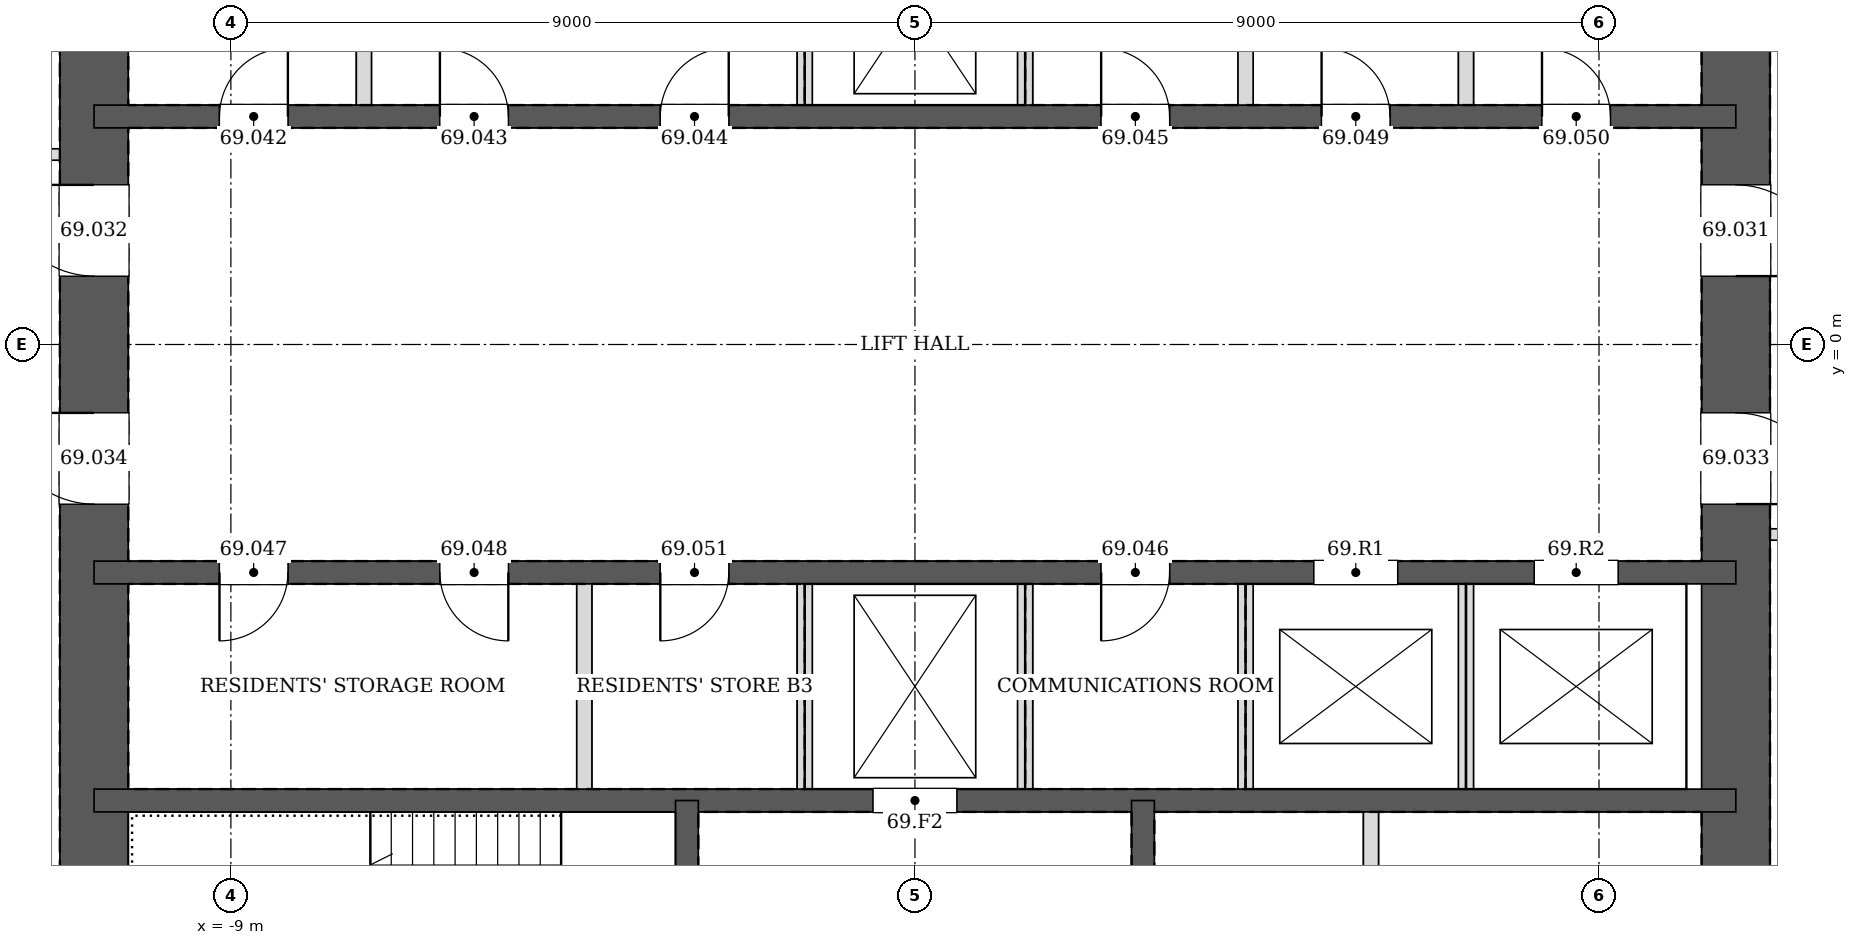
"""IFC4 building model, lengths in metres.
Left out: names, types, materials, properties, quantities, classifications, styles, units other than length and angle.
Written with IfcOpenShell. Run it as: python <this file> out.ifc"""

import sys

from ifc_helpers import new_model, si_unit, direction, frame, frame_2d, origin, place, context, subcontext, project, spatial, rectangle, extrude, element, fill, save


model = new_model("IFC4")
c1 = context("Model", 3, precision=1e-05, world=origin(), true_north=direction((0.0, 1.0)))
c2 = subcontext(c1, "Body", "Model", "MODEL_VIEW")
j1 = project(units=[si_unit("LENGTHUNIT", "METRE"), si_unit("PLANEANGLEUNIT", "RADIAN")], contexts=[c1])
p1 = place(None, origin())
s1 = spatial("IfcSite", under=j1, at=p1, CompositionType="ELEMENT")
p2 = place(p1, origin())
s2 = spatial("IfcBuilding", under=s1, at=p2, CompositionType="ELEMENT")
p3 = place(p2, frame((0.0, 0.0, 284.4)))
s3 = spatial("IfcBuildingStorey", under=s2, at=p3, CompositionType="ELEMENT", Elevation=284.4)
p4 = place(p3, frame((10.8, -10.8, 0.0), z_axis=(0.0, 0.0, 1.0), x_axis=(0.0, 1.0, 0.0)))
e1 = element("IfcWall", 1, at=p4, inside=s3, PredefinedType="SOLIDWALL", context=c2, shape_type="SweptSolid", body=[
    extrude(rectangle(XDim=21.6, YDim=0.9, at=frame_2d((10.8, 0.0))), origin(), (0.0, 0.0, 1.0), 3.4),
])
p5 = place(p4, frame((11.7, 0.0, 0.0)))
e2 = element("IfcOpeningElement", 2, at=p5, cuts=e1, PredefinedType="OPENING", context=c2, shape_type="SweptSolid", body=[
    extrude(rectangle(XDim=1.2, YDim=2.1, at=frame_2d((0.6, 1.05))), frame((0.0, 0.46, 0.0), z_axis=(0.0, -1.0, 0.0), x_axis=(1.0, 0.0, 0.0)), (0.0, 0.0, 1.0), 0.92),
])
p6 = place(p4, frame((8.7, 0.0, 0.0)))
e3 = element("IfcOpeningElement", 3, at=p6, cuts=e1, PredefinedType="OPENING", context=c2, shape_type="SweptSolid", body=[
    extrude(rectangle(XDim=1.2, YDim=2.1, at=frame_2d((0.6, 1.05))), frame((0.0, 0.46, 0.0), z_axis=(0.0, -1.0, 0.0), x_axis=(1.0, 0.0, 0.0)), (0.0, 0.0, 1.0), 0.92),
])
p7 = place(p3, frame((-10.8, 10.8, 0.0), z_axis=(0.0, 0.0, 1.0), x_axis=(0.0, -1.0, 0.0)))
e4 = element("IfcWall", 4, at=p7, inside=s3, PredefinedType="SOLIDWALL", context=c2, shape_type="SweptSolid", body=[
    extrude(rectangle(XDim=21.6, YDim=0.9, at=frame_2d((10.8, 0.0))), origin(), (0.0, 0.0, 1.0), 3.4),
])
p8 = place(p7, frame((8.7, 0.0, 0.0)))
e5 = element("IfcOpeningElement", 5, at=p8, cuts=e4, PredefinedType="OPENING", context=c2, shape_type="SweptSolid", body=[
    extrude(rectangle(XDim=1.2, YDim=2.1, at=frame_2d((0.6, 1.05))), frame((0.0, 0.46, 0.0), z_axis=(0.0, -1.0, 0.0), x_axis=(1.0, 0.0, 0.0)), (0.0, 0.0, 1.0), 0.92),
])
p9 = place(p7, frame((11.7, 0.0, 0.0)))
e6 = element("IfcOpeningElement", 6, at=p9, cuts=e4, PredefinedType="OPENING", context=c2, shape_type="SweptSolid", body=[
    extrude(rectangle(XDim=1.2, YDim=2.1, at=frame_2d((0.6, 1.05))), frame((0.0, 0.46, 0.0), z_axis=(0.0, -1.0, 0.0), x_axis=(1.0, 0.0, 0.0)), (0.0, 0.0, 1.0), 0.92),
])
p10 = place(p3, frame((-10.8, 3.0, 0.0), z_axis=(0.0, 0.0, 1.0), x_axis=(1.0, 0.0, 0.0)))
e7 = element("IfcWall", 7, at=p10, inside=s3, PredefinedType="SOLIDWALL", context=c2, shape_type="SweptSolid", body=[
    extrude(rectangle(XDim=21.6, YDim=0.3, at=frame_2d((10.8, 0.0))), origin(), (0.0, 0.0, 1.0), 3.4),
])
p11 = place(p10, frame((1.65, 0.0, 0.0)))
e8 = element("IfcOpeningElement", 8, at=p11, cuts=e7, PredefinedType="OPENING", context=c2, shape_type="SweptSolid", body=[
    extrude(rectangle(XDim=0.9, YDim=2.1, at=frame_2d((0.45, 1.05))), frame((0.0, 0.16, 0.0), z_axis=(0.0, -1.0, 0.0), x_axis=(1.0, 0.0, 0.0)), (0.0, 0.0, 1.0), 0.32),
])
p12 = place(p10, frame((4.55, 0.0, 0.0)))
e9 = element("IfcOpeningElement", 9, at=p12, cuts=e7, PredefinedType="OPENING", context=c2, shape_type="SweptSolid", body=[
    extrude(rectangle(XDim=0.9, YDim=2.1, at=frame_2d((0.45, 1.05))), frame((0.0, 0.16, 0.0), z_axis=(0.0, -1.0, 0.0), x_axis=(1.0, 0.0, 0.0)), (0.0, 0.0, 1.0), 0.32),
])
p13 = place(p10, frame((7.45, 0.0, 0.0)))
e10 = element("IfcOpeningElement", 10, at=p13, cuts=e7, PredefinedType="OPENING", context=c2, shape_type="SweptSolid", body=[
    extrude(rectangle(XDim=0.9, YDim=2.1, at=frame_2d((0.45, 1.05))), frame((0.0, 0.16, 0.0), z_axis=(0.0, -1.0, 0.0), x_axis=(1.0, 0.0, 0.0)), (0.0, 0.0, 1.0), 0.32),
])
p14 = place(p10, frame((13.25, 0.0, 0.0)))
e11 = element("IfcOpeningElement", 11, at=p14, cuts=e7, PredefinedType="OPENING", context=c2, shape_type="SweptSolid", body=[
    extrude(rectangle(XDim=0.9, YDim=2.1, at=frame_2d((0.45, 1.05))), frame((0.0, 0.16, 0.0), z_axis=(0.0, -1.0, 0.0), x_axis=(1.0, 0.0, 0.0)), (0.0, 0.0, 1.0), 0.32),
])
p15 = place(p10, frame((16.15, 0.0, 0.0)))
e12 = element("IfcOpeningElement", 12, at=p15, cuts=e7, PredefinedType="OPENING", context=c2, shape_type="SweptSolid", body=[
    extrude(rectangle(XDim=0.9, YDim=2.1, at=frame_2d((0.45, 1.05))), frame((0.0, 0.16, 0.0), z_axis=(0.0, -1.0, 0.0), x_axis=(1.0, 0.0, 0.0)), (0.0, 0.0, 1.0), 0.32),
])
p16 = place(p10, frame((19.05, 0.0, 0.0)))
e13 = element("IfcOpeningElement", 13, at=p16, cuts=e7, PredefinedType="OPENING", context=c2, shape_type="SweptSolid", body=[
    extrude(rectangle(XDim=0.9, YDim=2.1, at=frame_2d((0.45, 1.05))), frame((0.0, 0.16, 0.0), z_axis=(0.0, -1.0, 0.0), x_axis=(1.0, 0.0, 0.0)), (0.0, 0.0, 1.0), 0.32),
])
p17 = place(p3, frame((-10.8, -3.0, 0.0), z_axis=(0.0, 0.0, 1.0), x_axis=(1.0, 0.0, 0.0)))
e14 = element("IfcWall", 14, at=p17, inside=s3, PredefinedType="SOLIDWALL", context=c2, shape_type="SweptSolid", body=[
    extrude(rectangle(XDim=21.6, YDim=0.3, at=frame_2d((10.8, 0.0))), origin(), (0.0, 0.0, 1.0), 3.4),
])
p18 = place(p17, frame((13.25, 0.0, 0.0)))
e15 = element("IfcOpeningElement", 15, at=p18, cuts=e14, PredefinedType="OPENING", context=c2, shape_type="SweptSolid", body=[
    extrude(rectangle(XDim=0.9, YDim=2.1, at=frame_2d((0.45, 1.05))), frame((0.0, 0.16, 0.0), z_axis=(0.0, -1.0, 0.0), x_axis=(1.0, 0.0, 0.0)), (0.0, 0.0, 1.0), 0.32),
])
p19 = place(p17, frame((1.65, 0.0, 0.0)))
e16 = element("IfcOpeningElement", 16, at=p19, cuts=e14, PredefinedType="OPENING", context=c2, shape_type="SweptSolid", body=[
    extrude(rectangle(XDim=0.9, YDim=2.1, at=frame_2d((0.45, 1.05))), frame((0.0, 0.16, 0.0), z_axis=(0.0, -1.0, 0.0), x_axis=(1.0, 0.0, 0.0)), (0.0, 0.0, 1.0), 0.32),
])
p20 = place(p17, frame((4.55, 0.0, 0.0)))
e17 = element("IfcOpeningElement", 17, at=p20, cuts=e14, PredefinedType="OPENING", context=c2, shape_type="SweptSolid", body=[
    extrude(rectangle(XDim=0.9, YDim=2.1, at=frame_2d((0.45, 1.05))), frame((0.0, 0.16, 0.0), z_axis=(0.0, -1.0, 0.0), x_axis=(1.0, 0.0, 0.0)), (0.0, 0.0, 1.0), 0.32),
])
p21 = place(p17, frame((7.45, 0.0, 0.0)))
e18 = element("IfcOpeningElement", 18, at=p21, cuts=e14, PredefinedType="OPENING", context=c2, shape_type="SweptSolid", body=[
    extrude(rectangle(XDim=0.9, YDim=2.1, at=frame_2d((0.45, 1.05))), frame((0.0, 0.16, 0.0), z_axis=(0.0, -1.0, 0.0), x_axis=(1.0, 0.0, 0.0)), (0.0, 0.0, 1.0), 0.32),
])
p22 = place(p17, frame((16.05, 0.0, 0.0)))
e19 = element("IfcOpeningElement", 19, at=p22, cuts=e14, PredefinedType="OPENING", context=c2, shape_type="SweptSolid", body=[
    extrude(rectangle(XDim=1.1, YDim=2.1, at=frame_2d((0.55, 1.05))), frame((0.0, 0.16, 0.0), z_axis=(0.0, -1.0, 0.0), x_axis=(1.0, 0.0, 0.0)), (0.0, 0.0, 1.0), 0.32),
])
p23 = place(p17, frame((18.95, 0.0, 0.0)))
e20 = element("IfcOpeningElement", 20, at=p23, cuts=e14, PredefinedType="OPENING", context=c2, shape_type="SweptSolid", body=[
    extrude(rectangle(XDim=1.1, YDim=2.1, at=frame_2d((0.55, 1.05))), frame((0.0, 0.16, 0.0), z_axis=(0.0, -1.0, 0.0), x_axis=(1.0, 0.0, 0.0)), (0.0, 0.0, 1.0), 0.32),
])
p24 = place(p3, frame((-10.8, -6.0, 0.0), z_axis=(0.0, 0.0, 1.0), x_axis=(1.0, 0.0, 0.0)))
e21 = element("IfcWall", 21, at=p24, inside=s3, PredefinedType="SOLIDWALL", context=c2, shape_type="SweptSolid", body=[
    extrude(rectangle(XDim=21.6, YDim=0.3, at=frame_2d((10.8, 0.0))), origin(), (0.0, 0.0, 1.0), 3.4),
])
p25 = place(p24, frame((10.25, 0.0, 0.0)))
e22 = element("IfcOpeningElement", 22, at=p25, cuts=e21, PredefinedType="OPENING", context=c2, shape_type="SweptSolid", body=[
    extrude(rectangle(XDim=1.1, YDim=2.1, at=frame_2d((0.55, 1.05))), frame((0.0, 0.16, 0.0), z_axis=(0.0, -1.0, 0.0), x_axis=(1.0, 0.0, 0.0)), (0.0, 0.0, 1.0), 0.32),
])
p26 = place(p3, frame((-3.0, -6.0, 0.0), z_axis=(0.0, 0.0, 1.0), x_axis=(0.0, -1.0, 0.0)))
e23 = element("IfcWall", 23, at=p26, inside=s3, PredefinedType="SOLIDWALL", context=c2, shape_type="SweptSolid", body=[
    extrude(rectangle(XDim=4.8, YDim=0.3, at=frame_2d((2.4, 0.0))), origin(), (0.0, 0.0, 1.0), 3.4),
])
p27 = place(p26, frame((1.75, 0.0, 0.0)))
e24 = element("IfcOpeningElement", 24, at=p27, cuts=e23, PredefinedType="OPENING", context=c2, shape_type="SweptSolid", body=[
    extrude(rectangle(XDim=1.0, YDim=2.1, at=frame_2d((0.5, 1.05))), frame((0.0, 0.16, 0.0), z_axis=(0.0, -1.0, 0.0), x_axis=(1.0, 0.0, 0.0)), (0.0, 0.0, 1.0), 0.32),
])
p28 = place(p3, frame((3.0, -6.0, 0.0), z_axis=(0.0, 0.0, 1.0), x_axis=(0.0, -1.0, 0.0)))
e25 = element("IfcWall", 25, at=p28, inside=s3, PredefinedType="SOLIDWALL", context=c2, shape_type="SweptSolid", body=[
    extrude(rectangle(XDim=4.8, YDim=0.3, at=frame_2d((2.4, 0.0))), origin(), (0.0, 0.0, 1.0), 3.4),
])
for number, where, z_axis, x_axis in (
    (26, (11.25, -2.5, 0.0), (0.0, 0.0, 1.0), (1.0, 0.0, 0.0)),
    (27, (-11.25, 2.5, 0.0), (0.0, 0.0, 1.0), (-1.0, 0.0, 0.0)),
):
    element("IfcWall", number, at=place(p3, frame(where, z_axis=z_axis, x_axis=x_axis)), inside=s3, PredefinedType="PARTITIONING", context=c2, shape_type="SweptSolid", body=[
        extrude(rectangle(XDim=1.8, YDim=0.15, at=frame_2d((0.9, 0.0))), origin(), (0.0, 0.0, 1.0), 3.2),
    ])
for number, where, z_axis, x_axis in (
    (28, (-7.25, 3.15, 0.0), (0.0, 0.0, 1.0), (0.0, 1.0, 0.0)),
    (29, (-1.45, 3.15, 0.0), (0.0, 0.0, 1.0), (0.0, 1.0, 0.0)),
    (30, (1.45, 3.15, 0.0), (0.0, 0.0, 1.0), (0.0, 1.0, 0.0)),
    (31, (4.35, 3.15, 0.0), (0.0, 0.0, 1.0), (0.0, 1.0, 0.0)),
    (32, (7.25, 3.15, 0.0), (0.0, 0.0, 1.0), (0.0, 1.0, 0.0)),
    (33, (-4.35, -5.85, 0.0), (0.0, 0.0, 1.0), (0.0, 1.0, 0.0)),
    (34, (-1.45, -5.85, 0.0), (0.0, 0.0, 1.0), (0.0, 1.0, 0.0)),
    (35, (1.45, -5.85, 0.0), (0.0, 0.0, 1.0), (0.0, 1.0, 0.0)),
    (36, (4.35, -5.85, 0.0), (0.0, 0.0, 1.0), (0.0, 1.0, 0.0)),
):
    element("IfcWall", number, at=place(p3, frame(where, z_axis=z_axis, x_axis=x_axis)), inside=s3, PredefinedType="PARTITIONING", context=c2, shape_type="SweptSolid", body=[
        extrude(rectangle(XDim=2.7, YDim=0.2, at=frame_2d((1.35, 0.0))), origin(), (0.0, 0.0, 1.0), 3.2),
    ])
p29 = place(p3, frame((7.25, -5.85, 0.0), z_axis=(0.0, 0.0, 1.0), x_axis=(0.0, 1.0, 0.0)))
e37 = element("IfcWall", 37, at=p29, inside=s3, PredefinedType="PARTITIONING", context=c2, shape_type="SweptSolid", body=[
    extrude(rectangle(XDim=2.7, YDim=0.2, at=frame_2d((1.35, 0.0))), origin(), (0.0, 0.0, 1.0), 3.4),
])
p30 = place(p3, frame((6.0, -10.35, 0.0), z_axis=(0.0, 0.0, 1.0), x_axis=(0.0, 1.0, 0.0)))
e38 = element("IfcWall", 38, at=p30, inside=s3, PredefinedType="PARTITIONING", context=c2, shape_type="SweptSolid", body=[
    extrude(rectangle(XDim=4.2, YDim=0.2, at=frame_2d((2.1, 0.0))), origin(), (0.0, 0.0, 1.0), 3.2),
])
p31 = place(p30, frame((0.3, 0.0, 0.0)))
e39 = element("IfcOpeningElement", 39, at=p31, cuts=e38, PredefinedType="OPENING", context=c2, shape_type="SweptSolid", body=[
    extrude(rectangle(XDim=0.9, YDim=2.1, at=frame_2d((0.45, 1.05))), frame((0.0, 0.11, 0.0), z_axis=(0.0, -1.0, 0.0), x_axis=(1.0, 0.0, 0.0)), (0.0, 0.0, 1.0), 0.22),
])
p32 = place(p5, frame((1.2, 0.0, 0.0), z_axis=(0.0, 0.0, 1.0), x_axis=(-1.0, 0.0, 0.0)))
e40 = element("IfcDoor", 40, at=p32, inside=s3, OperationType="SINGLE_SWING_RIGHT", PredefinedType="DOOR", context=c2, shape_type="SweptSolid", body=[
    extrude(rectangle(XDim=1.2, YDim=2.1, at=frame_2d((0.6, 1.05))), frame((0.0, 0.025, 0.0), z_axis=(0.0, -1.0, 0.0), x_axis=(1.0, 0.0, 0.0)), (0.0, 0.0, 1.0), 0.05),
])
fill(e2, e40)
p33 = place(p8, frame((1.2, 0.0, 0.0), z_axis=(0.0, 0.0, 1.0), x_axis=(-1.0, 0.0, 0.0)))
e41 = element("IfcDoor", 41, at=p33, inside=s3, OperationType="SINGLE_SWING_RIGHT", PredefinedType="DOOR", context=c2, shape_type="SweptSolid", body=[
    extrude(rectangle(XDim=1.2, YDim=2.1, at=frame_2d((0.6, 1.05))), frame((0.0, 0.025, 0.0), z_axis=(0.0, -1.0, 0.0), x_axis=(1.0, 0.0, 0.0)), (0.0, 0.0, 1.0), 0.05),
])
fill(e5, e41)
p34 = place(p6, frame((1.2, 0.0, 0.0), z_axis=(0.0, 0.0, 1.0), x_axis=(-1.0, 0.0, 0.0)))
e42 = element("IfcDoor", 42, at=p34, inside=s3, OperationType="SINGLE_SWING_RIGHT", PredefinedType="DOOR", context=c2, shape_type="SweptSolid", body=[
    extrude(rectangle(XDim=1.2, YDim=2.1, at=frame_2d((0.6, 1.05))), frame((0.0, 0.025, 0.0), z_axis=(0.0, -1.0, 0.0), x_axis=(1.0, 0.0, 0.0)), (0.0, 0.0, 1.0), 0.05),
])
fill(e3, e42)
p35 = place(p9, frame((1.2, 0.0, 0.0), z_axis=(0.0, 0.0, 1.0), x_axis=(-1.0, 0.0, 0.0)))
e43 = element("IfcDoor", 43, at=p35, inside=s3, OperationType="SINGLE_SWING_RIGHT", PredefinedType="DOOR", context=c2, shape_type="SweptSolid", body=[
    extrude(rectangle(XDim=1.2, YDim=2.1, at=frame_2d((0.6, 1.05))), frame((0.0, 0.025, 0.0), z_axis=(0.0, -1.0, 0.0), x_axis=(1.0, 0.0, 0.0)), (0.0, 0.0, 1.0), 0.05),
])
fill(e6, e43)
p36 = place(p11, origin())
e44 = element("IfcDoor", 44, at=p36, inside=s3, OperationType="SINGLE_SWING_RIGHT", PredefinedType="DOOR", context=c2, shape_type="SweptSolid", body=[
    extrude(rectangle(XDim=0.9, YDim=2.1, at=frame_2d((0.45, 1.05))), frame((0.0, 0.025, 0.0), z_axis=(0.0, -1.0, 0.0), x_axis=(1.0, 0.0, 0.0)), (0.0, 0.0, 1.0), 0.05),
])
fill(e8, e44)
p37 = place(p12, origin())
e45 = element("IfcDoor", 45, at=p37, inside=s3, OperationType="SINGLE_SWING_LEFT", PredefinedType="DOOR", context=c2, shape_type="SweptSolid", body=[
    extrude(rectangle(XDim=0.9, YDim=2.1, at=frame_2d((0.45, 1.05))), frame((0.0, 0.025, 0.0), z_axis=(0.0, -1.0, 0.0), x_axis=(1.0, 0.0, 0.0)), (0.0, 0.0, 1.0), 0.05),
])
fill(e9, e45)
p38 = place(p13, origin())
e46 = element("IfcDoor", 46, at=p38, inside=s3, OperationType="SINGLE_SWING_RIGHT", PredefinedType="DOOR", context=c2, shape_type="SweptSolid", body=[
    extrude(rectangle(XDim=0.9, YDim=2.1, at=frame_2d((0.45, 1.05))), frame((0.0, 0.025, 0.0), z_axis=(0.0, -1.0, 0.0), x_axis=(1.0, 0.0, 0.0)), (0.0, 0.0, 1.0), 0.05),
])
fill(e10, e46)
p39 = place(p14, origin())
e47 = element("IfcDoor", 47, at=p39, inside=s3, OperationType="SINGLE_SWING_LEFT", PredefinedType="DOOR", context=c2, shape_type="SweptSolid", body=[
    extrude(rectangle(XDim=0.9, YDim=2.1, at=frame_2d((0.45, 1.05))), frame((0.0, 0.025, 0.0), z_axis=(0.0, -1.0, 0.0), x_axis=(1.0, 0.0, 0.0)), (0.0, 0.0, 1.0), 0.05),
])
fill(e11, e47)
p40 = place(p18, frame((0.9, 0.0, 0.0), z_axis=(0.0, 0.0, 1.0), x_axis=(-1.0, 0.0, 0.0)))
e48 = element("IfcDoor", 48, at=p40, inside=s3, OperationType="SINGLE_SWING_RIGHT", PredefinedType="DOOR", context=c2, shape_type="SweptSolid", body=[
    extrude(rectangle(XDim=0.9, YDim=2.1, at=frame_2d((0.45, 1.05))), frame((0.0, 0.025, 0.0), z_axis=(0.0, -1.0, 0.0), x_axis=(1.0, 0.0, 0.0)), (0.0, 0.0, 1.0), 0.05),
])
fill(e15, e48)
p41 = place(p19, frame((0.9, 0.0, 0.0), z_axis=(0.0, 0.0, 1.0), x_axis=(-1.0, 0.0, 0.0)))
e49 = element("IfcDoor", 49, at=p41, inside=s3, OperationType="SINGLE_SWING_RIGHT", PredefinedType="DOOR", context=c2, shape_type="SweptSolid", body=[
    extrude(rectangle(XDim=0.9, YDim=2.1, at=frame_2d((0.45, 1.05))), frame((0.0, 0.025, 0.0), z_axis=(0.0, -1.0, 0.0), x_axis=(1.0, 0.0, 0.0)), (0.0, 0.0, 1.0), 0.05),
])
fill(e16, e49)
p42 = place(p20, frame((0.9, 0.0, 0.0), z_axis=(0.0, 0.0, 1.0), x_axis=(-1.0, 0.0, 0.0)))
e50 = element("IfcDoor", 50, at=p42, inside=s3, OperationType="SINGLE_SWING_LEFT", PredefinedType="DOOR", context=c2, shape_type="SweptSolid", body=[
    extrude(rectangle(XDim=0.9, YDim=2.1, at=frame_2d((0.45, 1.05))), frame((0.0, 0.025, 0.0), z_axis=(0.0, -1.0, 0.0), x_axis=(1.0, 0.0, 0.0)), (0.0, 0.0, 1.0), 0.05),
])
fill(e17, e50)
p43 = place(p15, origin())
e51 = element("IfcDoor", 51, at=p43, inside=s3, OperationType="SINGLE_SWING_LEFT", PredefinedType="DOOR", context=c2, shape_type="SweptSolid", body=[
    extrude(rectangle(XDim=0.9, YDim=2.1, at=frame_2d((0.45, 1.05))), frame((0.0, 0.025, 0.0), z_axis=(0.0, -1.0, 0.0), x_axis=(1.0, 0.0, 0.0)), (0.0, 0.0, 1.0), 0.05),
])
fill(e12, e51)
p44 = place(p16, origin())
e52 = element("IfcDoor", 52, at=p44, inside=s3, OperationType="SINGLE_SWING_LEFT", PredefinedType="DOOR", context=c2, shape_type="SweptSolid", body=[
    extrude(rectangle(XDim=0.9, YDim=2.1, at=frame_2d((0.45, 1.05))), frame((0.0, 0.025, 0.0), z_axis=(0.0, -1.0, 0.0), x_axis=(1.0, 0.0, 0.0)), (0.0, 0.0, 1.0), 0.05),
])
fill(e13, e52)
p45 = place(p21, frame((0.9, 0.0, 0.0), z_axis=(0.0, 0.0, 1.0), x_axis=(-1.0, 0.0, 0.0)))
e53 = element("IfcDoor", 53, at=p45, inside=s3, OperationType="SINGLE_SWING_RIGHT", PredefinedType="DOOR", context=c2, shape_type="SweptSolid", body=[
    extrude(rectangle(XDim=0.9, YDim=2.1, at=frame_2d((0.45, 1.05))), frame((0.0, 0.025, 0.0), z_axis=(0.0, -1.0, 0.0), x_axis=(1.0, 0.0, 0.0)), (0.0, 0.0, 1.0), 0.05),
])
fill(e18, e53)
p46 = place(p25, origin())
e54 = element("IfcDoor", 54, at=p46, inside=s3, OperationType="DOUBLE_DOOR_SLIDING", PredefinedType="DOOR", context=c2, shape_type="SweptSolid", body=[
    extrude(rectangle(XDim=1.1, YDim=2.1, at=frame_2d((0.55, 1.05))), frame((0.0, 0.025, 0.0), z_axis=(0.0, -1.0, 0.0), x_axis=(1.0, 0.0, 0.0)), (0.0, 0.0, 1.0), 0.05),
])
fill(e22, e54)
p47 = place(p22, origin())
e55 = element("IfcDoor", 55, at=p47, inside=s3, OperationType="DOUBLE_DOOR_SLIDING", PredefinedType="DOOR", context=c2, shape_type="SweptSolid", body=[
    extrude(rectangle(XDim=1.1, YDim=2.1, at=frame_2d((0.55, 1.05))), frame((0.0, 0.025, 0.0), z_axis=(0.0, -1.0, 0.0), x_axis=(1.0, 0.0, 0.0)), (0.0, 0.0, 1.0), 0.05),
])
fill(e19, e55)
p48 = place(p23, origin())
e56 = element("IfcDoor", 56, at=p48, inside=s3, OperationType="DOUBLE_DOOR_SLIDING", PredefinedType="DOOR", context=c2, shape_type="SweptSolid", body=[
    extrude(rectangle(XDim=1.1, YDim=2.1, at=frame_2d((0.55, 1.05))), frame((0.0, 0.025, 0.0), z_axis=(0.0, -1.0, 0.0), x_axis=(1.0, 0.0, 0.0)), (0.0, 0.0, 1.0), 0.05),
])
fill(e20, e56)
save(model, sys.argv[1])
